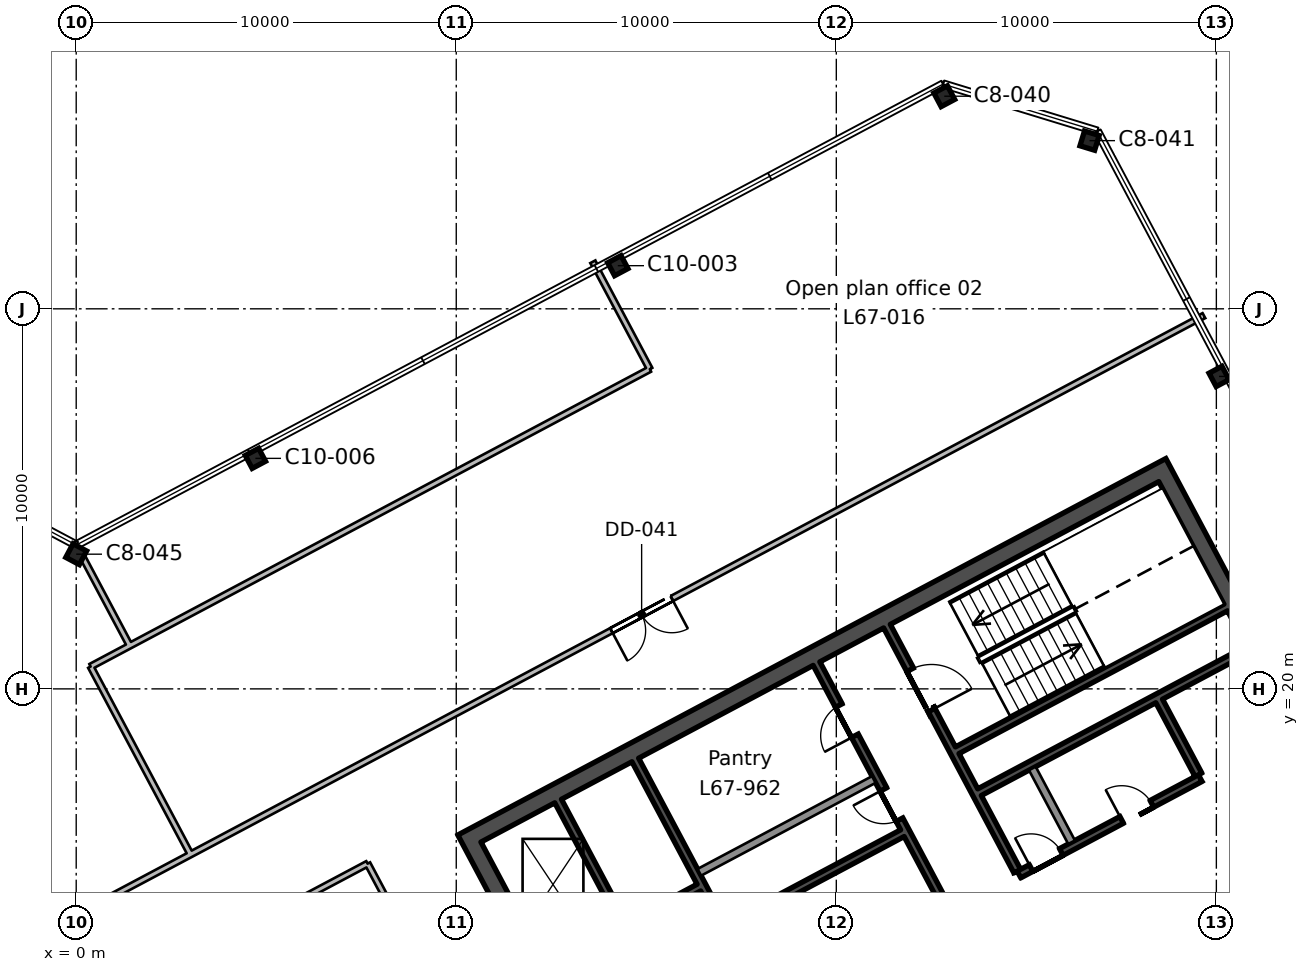
"""IFC4 building model, lengths in metres.
Left out: names, types, materials, properties, quantities, classifications, styles, units other than length and angle.
Written with IfcOpenShell. Run it as: python <this file> out.ifc"""

import sys

from ifc_helpers import new_model, si_unit, direction, frame, frame_2d, origin, origin_2d, place, context, subcontext, project, spatial, rectangle, i_section, extrude, element, fill, save


model = new_model("IFC4")
c1 = context("Model", 3, precision=1e-05, world=origin(), true_north=direction((0.0, 1.0)))
c2 = subcontext(c1, "Body", "Model", "MODEL_VIEW")
j1 = project(units=[si_unit("LENGTHUNIT", "METRE"), si_unit("PLANEANGLEUNIT", "RADIAN")], contexts=[c1])
p1 = place(None, origin())
s1 = spatial("IfcSite", under=j1, at=p1, CompositionType="ELEMENT")
p2 = place(p1, origin())
s2 = spatial("IfcBuilding", under=s1, at=p2, CompositionType="ELEMENT")
p3 = place(p2, frame((0.0, 0.0, 297.0)))
s3 = spatial("IfcBuildingStorey", under=s2, at=p3, CompositionType="ELEMENT", Elevation=297.0)
p4 = place(p3, frame((0.0, 23.544, 0.0), z_axis=(0.0, 0.0, 1.0), x_axis=(-0.882947592859, 0.469471562786, 0.0)))
e1 = element("IfcColumn", 1, at=p4, inside=s3, PredefinedType="COLUMN", context=c2, shape_type="SweptSolid", body=[
    extrude(i_section(OverallWidth=0.404, OverallDepth=0.406, WebThickness=0.027, FlangeThickness=0.044, FilletRadius=0.015, at=origin_2d()), origin(), (0.0, 0.0, 1.0), 3.9),
])
for number, where, z_axis, x_axis in (
    (2, (4.715, 26.065, 0.0), (0.0, 0.0, 1.0), (-0.883, -0.469, 0.0)),
    (3, (30.071, 28.221, 0.0), (0.0, 0.0, 1.0), (-0.469, 0.883, 0.0)),
    (4, (14.251, 31.135, 0.0), (0.0, 0.0, 1.0), (-0.883, -0.469, 0.0)),
):
    element("IfcColumn", number, at=place(p3, frame(where, z_axis=z_axis, x_axis=x_axis)), inside=s3, PredefinedType="COLUMN", context=c2, shape_type="SweptSolid", body=[
        extrude(i_section(OverallWidth=0.399, OverallDepth=0.386, WebThickness=0.021, FlangeThickness=0.033, FilletRadius=0.015, at=origin_2d()), origin(), (0.0, 0.0, 1.0), 3.9),
    ])
for number, where, z_axis, x_axis in (
    (5, (26.664, 34.425, 0.0), (0.0, 0.0, 1.0), (-0.956, 0.292, 0.0)),
    (6, (22.841, 35.594, 0.0), (0.0, 0.0, 1.0), (-0.883, -0.469, 0.0)),
):
    element("IfcColumn", number, at=place(p3, frame(where, z_axis=z_axis, x_axis=x_axis)), inside=s3, PredefinedType="COLUMN", context=c2, shape_type="SweptSolid", body=[
        extrude(i_section(OverallWidth=0.404, OverallDepth=0.406, WebThickness=0.027, FlangeThickness=0.044, FilletRadius=0.015, at=origin_2d()), origin(), (0.0, 0.0, 1.0), 3.9),
    ])
p5 = place(p3, frame((19.207, -0.604, 0.0), z_axis=(0.0, 0.0, 1.0), x_axis=(-0.469467968382, 0.882949504028, 0.0)))
e7 = element("IfcWall", 7, at=p5, inside=s3, PredefinedType="SHEAR", context=c2, shape_type="SweptSolid", body=[
    extrude(rectangle(XDim=19.1, YDim=0.45, at=frame_2d((9.55, 0.0))), origin(), (0.0, 0.0, 1.0), 3.9),
])
p6 = place(p5, frame((6.55, 0.0, 0.0)))
e8 = element("IfcOpeningElement", 8, at=p6, cuts=e7, PredefinedType="OPENING", context=c2, shape_type="SweptSolid", body=[
    extrude(rectangle(XDim=2.4, YDim=2.4, at=frame_2d((1.2, 1.2))), frame((0.0, 0.235, 0.0), z_axis=(0.0, -1.0, 0.0), x_axis=(1.0, 0.0, 0.0)), (0.0, 0.0, 1.0), 0.47),
])
p7 = place(p3, frame((37.439, 9.091, 0.0), z_axis=(0.0, 0.0, 1.0), x_axis=(-0.469467968382, 0.882949504028, 0.0)))
e9 = element("IfcWall", 9, at=p7, inside=s3, PredefinedType="SHEAR", context=c2, shape_type="SweptSolid", body=[
    extrude(rectangle(XDim=19.1, YDim=0.45, at=frame_2d((9.55, 0.0))), origin(), (0.0, 0.0, 1.0), 3.9),
])
p8 = place(p7, frame((10.15, 0.0, 0.0)))
e10 = element("IfcOpeningElement", 10, at=p8, cuts=e9, PredefinedType="OPENING", context=c2, shape_type="SweptSolid", body=[
    extrude(rectangle(XDim=2.4, YDim=2.4, at=frame_2d((1.2, 1.2))), frame((0.0, 0.235, 0.0), z_axis=(0.0, -1.0, 0.0), x_axis=(1.0, 0.0, 0.0)), (0.0, 0.0, 1.0), 0.47),
])
p9 = place(p3, frame((10.544, 16.167, 0.0), z_axis=(0.0, 0.0, 1.0), x_axis=(0.882947755831, 0.46947125628, 0.0)))
e11 = element("IfcWall", 11, at=p9, inside=s3, PredefinedType="SHEAR", context=c2, shape_type="SweptSolid", body=[
    extrude(rectangle(XDim=20.2, YDim=0.45, at=frame_2d((10.1, 0.0))), origin(), (0.0, 0.0, 1.0), 3.9),
])
p10 = place(p3, frame((14.394, 13.826, 0.0), z_axis=(0.0, 0.0, 1.0), x_axis=(-0.469494272526, 0.882935517501, 0.0)))
e12 = element("IfcWall", 12, at=p10, inside=s3, PredefinedType="SHEAR", context=c2, shape_type="SweptSolid", body=[
    extrude(rectangle(XDim=3.65, YDim=0.2, at=frame_2d((1.825, 0.0))), origin(), (0.0, 0.0, 1.0), 3.9),
])
p11 = place(p3, frame((18.138, 11.683, 0.0), z_axis=(0.0, 0.0, 1.0), x_axis=(-0.469480409012, 0.88294288918, 0.0)))
e13 = element("IfcWall", 13, at=p11, inside=s3, PredefinedType="SHEAR", context=c2, shape_type="SweptSolid", body=[
    extrude(rectangle(XDim=7.3, YDim=0.2, at=frame_2d((3.65, 0.0))), origin(), (0.0, 0.0, 1.0), 3.9),
])
p12 = place(p3, frame((22.906, 14.218, 0.0), z_axis=(0.0, 0.0, 1.0), x_axis=(-0.469480409012, 0.88294288918, 0.0)))
e14 = element("IfcWall", 14, at=p12, inside=s3, PredefinedType="SHEAR", context=c2, shape_type="SweptSolid", body=[
    extrude(rectangle(XDim=7.3, YDim=0.2, at=frame_2d((3.65, 0.0))), origin(), (0.0, 0.0, 1.0), 3.9),
])
p13 = place(p12, frame((2.65, 0.0, 0.0)))
e15 = element("IfcOpeningElement", 15, at=p13, cuts=e14, PredefinedType="OPENING", context=c2, shape_type="SweptSolid", body=[
    extrude(rectangle(XDim=0.9, YDim=2.1, at=frame_2d((0.45, 1.05))), frame((0.0, 0.11, 0.0), z_axis=(0.0, -1.0, 0.0), x_axis=(1.0, 0.0, 0.0)), (0.0, 0.0, 1.0), 0.22),
])
p14 = place(p12, frame((5.15, 0.0, 0.0)))
e16 = element("IfcOpeningElement", 16, at=p14, cuts=e14, PredefinedType="OPENING", context=c2, shape_type="SweptSolid", body=[
    extrude(rectangle(XDim=0.9, YDim=2.1, at=frame_2d((0.45, 1.05))), frame((0.0, 0.11, 0.0), z_axis=(0.0, -1.0, 0.0), x_axis=(1.0, 0.0, 0.0)), (0.0, 0.0, 1.0), 0.22),
])
p15 = place(p3, frame((24.76, 15.204, 0.0), z_axis=(0.0, 0.0, 1.0), x_axis=(-0.469494272526, 0.882935517501, 0.0)))
e17 = element("IfcWall", 17, at=p15, inside=s3, PredefinedType="SHEAR", context=c2, shape_type="SweptSolid", body=[
    extrude(rectangle(XDim=7.3, YDim=0.2, at=frame_2d((3.65, 0.0))), origin(), (0.0, 0.0, 1.0), 3.9),
])
p16 = place(p15, frame((4.8, 0.0, 0.0)))
e18 = element("IfcOpeningElement", 18, at=p16, cuts=e17, PredefinedType="OPENING", context=c2, shape_type="SweptSolid", body=[
    extrude(rectangle(XDim=1.2, YDim=2.1, at=frame_2d((0.6, 1.05))), frame((0.0, 0.11, 0.0), z_axis=(0.0, -1.0, 0.0), x_axis=(1.0, 0.0, 0.0)), (0.0, 0.0, 1.0), 0.22),
])
p17 = place(p3, frame((26.191, 15.965, 0.0), z_axis=(0.0, 0.0, 1.0), x_axis=(-0.469533832133, 0.882914480843, 0.0)))
e19 = element("IfcWall", 19, at=p17, inside=s3, PredefinedType="SOLIDWALL", context=c2, shape_type="SweptSolid", body=[
    extrude(rectangle(XDim=2.2, YDim=0.2, at=frame_2d((1.1, 0.0))), origin(), (0.0, 0.0, 1.0), 3.9),
])
p18 = place(p3, frame((29.528, 17.739, 0.0), z_axis=(0.0, 0.0, 1.0), x_axis=(-0.469401318492, 0.882984938828, 0.0)))
e20 = element("IfcWall", 20, at=p18, inside=s3, PredefinedType="SHEAR", context=c2, shape_type="SweptSolid", body=[
    extrude(rectangle(XDim=2.2, YDim=0.2, at=frame_2d((1.1, 0.0))), origin(), (0.0, 0.0, 1.0), 3.9),
])
p19 = place(p3, frame((24.726, 11.222, 0.0), z_axis=(0.0, 0.0, 1.0), x_axis=(0.882940221191, 0.469485426614, 0.0)))
e21 = element("IfcWall", 21, at=p19, inside=s3, PredefinedType="SHEAR", context=c2, shape_type="SweptSolid", body=[
    extrude(rectangle(XDim=10.0, YDim=0.2, at=frame_2d((5.0, 0.0))), origin(), (0.0, 0.0, 1.0), 3.9),
])
p20 = place(p19, frame((6.3, 0.0, 0.0)))
e22 = element("IfcOpeningElement", 22, at=p20, cuts=e21, PredefinedType="OPENING", context=c2, shape_type="SweptSolid", body=[
    extrude(rectangle(XDim=1.2, YDim=2.1, at=frame_2d((0.6, 1.05))), frame((0.0, 0.11, 0.0), z_axis=(0.0, -1.0, 0.0), x_axis=(1.0, 0.0, 0.0)), (0.0, 0.0, 1.0), 0.22),
])
p21 = place(p19, frame((0.36, 0.0, 0.0)))
e23 = element("IfcOpeningElement", 23, at=p21, cuts=e21, PredefinedType="OPENING", context=c2, shape_type="SweptSolid", body=[
    extrude(rectangle(XDim=0.9, YDim=2.1, at=frame_2d((0.45, 1.05))), frame((0.0, 0.11, 0.0), z_axis=(0.0, -1.0, 0.0), x_axis=(1.0, 0.0, 0.0)), (0.0, 0.0, 1.0), 0.22),
])
p22 = place(p19, frame((3.06, 0.0, 0.0)))
e24 = element("IfcOpeningElement", 24, at=p22, cuts=e21, PredefinedType="OPENING", context=c2, shape_type="SweptSolid", body=[
    extrude(rectangle(XDim=0.9, YDim=2.1, at=frame_2d((0.45, 1.05))), frame((0.0, 0.11, 0.0), z_axis=(0.0, -1.0, 0.0), x_axis=(1.0, 0.0, 0.0)), (0.0, 0.0, 1.0), 0.22),
])
p23 = place(p3, frame((24.807, 15.116, 0.0), z_axis=(0.0, 0.0, 1.0), x_axis=(0.882942972946, 0.469480251476, 0.0)))
e25 = element("IfcWall", 25, at=p23, inside=s3, PredefinedType="SHEAR", context=c2, shape_type="SweptSolid", body=[
    extrude(rectangle(XDim=5.4, YDim=0.2, at=frame_2d((2.7, 0.0))), origin(), (0.0, 0.0, 1.0), 3.9),
])
p24 = place(p23, frame((0.36, 0.0, 0.0)))
e26 = element("IfcOpeningElement", 26, at=p24, cuts=e25, PredefinedType="OPENING", context=c2, shape_type="SweptSolid", body=[
    extrude(rectangle(XDim=0.9, YDim=2.1, at=frame_2d((0.45, 1.05))), frame((0.0, 0.11, 0.0), z_axis=(0.0, -1.0, 0.0), x_axis=(1.0, 0.0, 0.0)), (0.0, 0.0, 1.0), 0.22),
])
p25 = place(p23, frame((3.06, 0.0, 0.0)))
e27 = element("IfcOpeningElement", 27, at=p25, cuts=e25, PredefinedType="OPENING", context=c2, shape_type="SweptSolid", body=[
    extrude(rectangle(XDim=0.9, YDim=2.1, at=frame_2d((0.45, 1.05))), frame((0.0, 0.11, 0.0), z_axis=(0.0, -1.0, 0.0), x_axis=(1.0, 0.0, 0.0)), (0.0, 0.0, 1.0), 0.22),
])
p26 = place(p3, frame((17.147, 13.761, 0.0), z_axis=(0.0, 0.0, 1.0), x_axis=(0.882964314875, 0.469440111896, 0.0)))
e28 = element("IfcWall", 28, at=p26, inside=s3, PredefinedType="SHEAR", context=c2, shape_type="SweptSolid", body=[
    extrude(rectangle(XDim=5.2, YDim=0.2, at=frame_2d((2.6, 0.0))), origin(), (0.0, 0.0, 1.0), 3.9),
])
p27 = place(p3, frame((23.769, 17.282, 0.0), z_axis=(0.0, 0.0, 1.0), x_axis=(0.882940221191, 0.469485426614, 0.0)))
e29 = element("IfcWall", 29, at=p27, inside=s3, PredefinedType="SHEAR", context=c2, shape_type="SweptSolid", body=[
    extrude(rectangle(XDim=8.0, YDim=0.2, at=frame_2d((4.0, 0.0))), origin(), (0.0, 0.0, 1.0), 3.9),
])
p28 = place(p3, frame((12.41, 12.658, 0.0), z_axis=(0.0, 0.0, 1.0), x_axis=(0.8829484765, 0.469469900894, 0.0)))
e30 = element("IfcWall", 30, at=p28, inside=s3, PredefinedType="SHEAR", context=c2, shape_type="SweptSolid", body=[
    extrude(rectangle(XDim=4.5, YDim=0.2, at=frame_2d((2.25, 0.0))), origin(), (0.0, 0.0, 1.0), 3.9),
])
p29 = place(p28, frame((0.6, 0.0, 0.0)))
e31 = element("IfcOpeningElement", 31, at=p29, cuts=e30, PredefinedType="OPENING", context=c2, shape_type="SweptSolid", body=[
    extrude(rectangle(XDim=1.1, YDim=2.1, at=frame_2d((0.55, 1.05))), frame((0.0, 0.11, 0.0), z_axis=(0.0, -1.0, 0.0), x_axis=(1.0, 0.0, 0.0)), (0.0, 0.0, 1.0), 0.22),
])
p30 = place(p3, frame((23.182, 18.385, 0.0), z_axis=(0.0, 0.0, 1.0), x_axis=(0.88295287151, 0.469461634952, 0.0)))
e32 = element("IfcWall", 32, at=p30, inside=s3, PredefinedType="SHEAR", context=c2, shape_type="SweptSolid", body=[
    extrude(rectangle(XDim=8.0, YDim=0.2, at=frame_2d((4.0, 0.0))), origin(), (0.0, 0.0, 1.0), 3.9),
])
p31 = place(p3, frame((16.396, 15.173, 0.0), z_axis=(0.0, 0.0, 1.0), x_axis=(0.882934506056, 0.469496174655, 0.0)))
e33 = element("IfcWall", 33, at=p31, inside=s3, PredefinedType="SOLIDWALL", context=c2, shape_type="SweptSolid", body=[
    extrude(rectangle(XDim=5.2, YDim=0.2, at=frame_2d((2.6, 0.0))), origin(), (0.0, 0.0, 1.0), 3.9),
])
p32 = place(p3, frame((-48.541, 39.854, 0.0), z_axis=(0.0, 0.0, 1.0), x_axis=(0.882945008423, -0.469476423372, 0.0)))
e34 = element("IfcWall", 34, at=p32, inside=s3, PredefinedType="PARTITIONING", context=c2, shape_type="SweptSolid", body=[
    extrude(rectangle(XDim=54.976, YDim=0.15, at=frame_2d((27.488, 0.0))), origin(), (0.0, 0.0, 1.0), 3.54),
])
p33 = place(p32, frame((39.35, 0.0, 0.0)))
e35 = element("IfcOpeningElement", 35, at=p33, cuts=e34, PredefinedType="OPENING", context=c2, shape_type="SweptSolid", body=[
    extrude(rectangle(XDim=1.0, YDim=2.1, at=frame_2d((0.5, 1.05))), frame((0.0, 0.085, 0.0), z_axis=(0.0, -1.0, 0.0), x_axis=(1.0, 0.0, 0.0)), (0.0, 0.0, 1.0), 0.17),
])
p34 = place(p32, frame((26.95, 0.0, 0.0)))
e36 = element("IfcOpeningElement", 36, at=p34, cuts=e34, PredefinedType="OPENING", context=c2, shape_type="SweptSolid", body=[
    extrude(rectangle(XDim=1.0, YDim=2.1, at=frame_2d((0.5, 1.05))), frame((0.0, 0.085, 0.0), z_axis=(0.0, -1.0, 0.0), x_axis=(1.0, 0.0, 0.0)), (0.0, 0.0, 1.0), 0.17),
])
p35 = place(p32, frame((21.049, 0.0, 0.0)))
e37 = element("IfcOpeningElement", 37, at=p35, cuts=e34, PredefinedType="OPENING", context=c2, shape_type="SweptSolid", body=[
    extrude(rectangle(XDim=1.0, YDim=2.1, at=frame_2d((0.5, 1.05))), frame((0.0, 0.085, 0.0), z_axis=(0.0, -1.0, 0.0), x_axis=(1.0, 0.0, 0.0)), (0.0, 0.0, 1.0), 0.17),
])
p36 = place(p32, frame((15.35, 0.0, 0.0)))
e38 = element("IfcOpeningElement", 38, at=p36, cuts=e34, PredefinedType="OPENING", context=c2, shape_type="SweptSolid", body=[
    extrude(rectangle(XDim=1.0, YDim=2.1, at=frame_2d((0.5, 1.05))), frame((0.0, 0.085, 0.0), z_axis=(0.0, -1.0, 0.0), x_axis=(1.0, 0.0, 0.0)), (0.0, 0.0, 1.0), 0.17),
])
p37 = place(p3, frame((0.0, 14.044, 0.0), z_axis=(0.0, 0.0, 1.0), x_axis=(0.882952097871, 0.469463089992, 0.0)))
e39 = element("IfcWall", 39, at=p37, inside=s3, PredefinedType="PARTITIONING", context=c2, shape_type="SweptSolid", body=[
    extrude(rectangle(XDim=33.607, YDim=0.15, at=frame_2d((16.803, 0.0))), origin(), (0.0, 0.0, 1.0), 3.54),
])
p38 = place(p37, frame((15.95, 0.0, 0.0)))
e40 = element("IfcOpeningElement", 40, at=p38, cuts=e39, PredefinedType="OPENING", context=c2, shape_type="SweptSolid", body=[
    extrude(rectangle(XDim=1.8, YDim=2.1, at=frame_2d((0.9, 1.05))), frame((0.0, 0.085, 0.0), z_axis=(0.0, -1.0, 0.0), x_axis=(1.0, 0.0, 0.0)), (0.0, 0.0, 1.0), 0.17),
])
p39 = place(p3, frame((2.38, 16.825, 0.0), z_axis=(0.0, 0.0, 1.0), x_axis=(0.469328592165, -0.88302359684, 0.0)))
e41 = element("IfcWall", 41, at=p39, inside=s3, PredefinedType="PARTITIONING", context=c2, shape_type="SweptSolid", body=[
    extrude(rectangle(XDim=1.338, YDim=0.15, at=frame_2d((0.669, 0.0))), origin(), (0.0, 0.0, 1.0), 3.54),
])
p40 = place(p3, frame((0.178, 23.45, 0.0), z_axis=(0.0, 0.0, 1.0), x_axis=(0.469495603372, -0.882934809833, 0.0)))
e42 = element("IfcWall", 42, at=p40, inside=s3, PredefinedType="PARTITIONING", context=c2, shape_type="SweptSolid", body=[
    extrude(rectangle(XDim=2.622, YDim=0.15, at=frame_2d((1.311, 0.0))), origin(), (0.0, 0.0, 1.0), 3.54),
])
p41 = place(p3, frame((1.405, 21.133, 0.0), z_axis=(0.0, 0.0, 1.0), x_axis=(0.882934197132, 0.469496755618, 0.0)))
e43 = element("IfcWall", 43, at=p41, inside=s3, PredefinedType="PARTITIONING", context=c2, shape_type="SweptSolid", body=[
    extrude(rectangle(XDim=15.504, YDim=0.15, at=frame_2d((7.752, 0.0))), origin(), (0.0, 0.0, 1.0), 3.54),
])
p42 = place(p3, frame((15.094, 28.412, 0.0), z_axis=(0.0, 0.0, 1.0), x_axis=(-0.469082703107, 0.883154243406, 0.0)))
e44 = element("IfcWall", 44, at=p42, inside=s3, PredefinedType="PARTITIONING", context=c2, shape_type="SweptSolid", body=[
    extrude(rectangle(XDim=3.2, YDim=0.15, at=frame_2d((1.6, 0.0))), origin(), (0.0, 0.0, 1.0), 3.54),
])
p43 = place(p3, frame((2.38, 16.825, 0.0), z_axis=(0.0, 0.0, 1.0), x_axis=(-0.469505616232, 0.882929485478, 0.0)))
e45 = element("IfcWall", 45, at=p43, inside=s3, PredefinedType="PARTITIONING", context=c2, shape_type="SweptSolid", body=[
    extrude(rectangle(XDim=4.262, YDim=0.15, at=frame_2d((2.131, 0.0))), origin(), (0.0, 0.0, 1.0), 3.54),
])
p44 = place(p3, frame((1.405, 21.133, 0.0), z_axis=(0.0, 0.0, 1.0), x_axis=(-0.882753784089, -0.469835882704, 0.0)))
e46 = element("IfcWall", 46, at=p44, inside=s3, PredefinedType="PARTITIONING", context=c2, shape_type="SweptSolid", body=[
    extrude(rectangle(XDim=1.162, YDim=0.15, at=frame_2d((0.581, 0.0))), origin(), (0.0, 0.0, 1.0), 3.54),
])
p45 = place(p3, frame((7.667, 15.402, 0.0), z_axis=(0.0, 0.0, 1.0), x_axis=(-0.883005489543, -0.469362658759, 0.0)))
e47 = element("IfcWall", 47, at=p45, inside=s3, PredefinedType="PARTITIONING", context=c2, shape_type="SweptSolid", body=[
    extrude(rectangle(XDim=3.413, YDim=0.15, at=frame_2d((1.707, 0.0))), origin(), (0.0, 0.0, 1.0), 3.54),
])
p46 = place(p3, frame((8.518, 13.8, 0.0), z_axis=(0.0, 0.0, 1.0), x_axis=(-0.469148666032, 0.883119204389, 0.0)))
e48 = element("IfcWall", 48, at=p46, inside=s3, PredefinedType="PARTITIONING", context=c2, shape_type="SweptSolid", body=[
    extrude(rectangle(XDim=1.814, YDim=0.15, at=frame_2d((0.907, 0.0))), origin(), (0.0, 0.0, 1.0), 3.54),
])
p47 = place(p20, frame((1.2, 0.0, 0.0), z_axis=(0.0, 0.0, 1.0), x_axis=(-1.0, 0.0, 0.0)))
e49 = element("IfcDoor", 49, at=p47, inside=s3, OperationType="SINGLE_SWING_RIGHT", PredefinedType="DOOR", context=c2, shape_type="SweptSolid", body=[
    extrude(rectangle(XDim=1.2, YDim=2.1, at=frame_2d((0.6, 1.05))), frame((0.0, 0.025, 0.0), z_axis=(0.0, -1.0, 0.0), x_axis=(1.0, 0.0, 0.0)), (0.0, 0.0, 1.0), 0.05),
])
fill(e22, e49)
p48 = place(p16, frame((1.2, 0.0, 0.0), z_axis=(0.0, 0.0, 1.0), x_axis=(-1.0, 0.0, 0.0)))
e50 = element("IfcDoor", 50, at=p48, inside=s3, OperationType="SINGLE_SWING_RIGHT", PredefinedType="DOOR", context=c2, shape_type="SweptSolid", body=[
    extrude(rectangle(XDim=1.2, YDim=2.1, at=frame_2d((0.6, 1.05))), frame((0.0, 0.025, 0.0), z_axis=(0.0, -1.0, 0.0), x_axis=(1.0, 0.0, 0.0)), (0.0, 0.0, 1.0), 0.05),
])
fill(e18, e50)
p49 = place(p24, origin())
e51 = element("IfcDoor", 51, at=p49, inside=s3, OperationType="SINGLE_SWING_LEFT", PredefinedType="DOOR", context=c2, shape_type="SweptSolid", body=[
    extrude(rectangle(XDim=0.9, YDim=2.1, at=frame_2d((0.45, 1.05))), frame((0.0, 0.025, 0.0), z_axis=(0.0, -1.0, 0.0), x_axis=(1.0, 0.0, 0.0)), (0.0, 0.0, 1.0), 0.05),
])
fill(e26, e51)
p50 = place(p25, origin())
e52 = element("IfcDoor", 52, at=p50, inside=s3, OperationType="SINGLE_SWING_LEFT", PredefinedType="DOOR", context=c2, shape_type="SweptSolid", body=[
    extrude(rectangle(XDim=0.9, YDim=2.1, at=frame_2d((0.45, 1.05))), frame((0.0, 0.025, 0.0), z_axis=(0.0, -1.0, 0.0), x_axis=(1.0, 0.0, 0.0)), (0.0, 0.0, 1.0), 0.05),
])
fill(e27, e52)
p51 = place(p13, origin())
e53 = element("IfcDoor", 53, at=p51, inside=s3, OperationType="SINGLE_SWING_RIGHT", PredefinedType="DOOR", context=c2, shape_type="SweptSolid", body=[
    extrude(rectangle(XDim=0.9, YDim=2.1, at=frame_2d((0.45, 1.05))), frame((0.0, 0.025, 0.0), z_axis=(0.0, -1.0, 0.0), x_axis=(1.0, 0.0, 0.0)), (0.0, 0.0, 1.0), 0.05),
])
fill(e15, e53)
p52 = place(p14, origin())
e54 = element("IfcDoor", 54, at=p52, inside=s3, OperationType="SINGLE_SWING_LEFT", PredefinedType="DOOR", context=c2, shape_type="SweptSolid", body=[
    extrude(rectangle(XDim=0.9, YDim=2.1, at=frame_2d((0.45, 1.05))), frame((0.0, 0.025, 0.0), z_axis=(0.0, -1.0, 0.0), x_axis=(1.0, 0.0, 0.0)), (0.0, 0.0, 1.0), 0.05),
])
fill(e16, e54)
p53 = place(p38, frame((1.8, 0.0, 0.0), z_axis=(0.0, 0.0, 1.0), x_axis=(-1.0, 0.0, 0.0)))
e55 = element("IfcDoor", 55, at=p53, inside=s3, OperationType="DOUBLE_DOOR_SINGLE_SWING", PredefinedType="DOOR", context=c2, shape_type="SweptSolid", body=[
    extrude(rectangle(XDim=1.8, YDim=2.1, at=frame_2d((0.9, 1.05))), frame((0.0, 0.025, 0.0), z_axis=(0.0, -1.0, 0.0), x_axis=(1.0, 0.0, 0.0)), (0.0, 0.0, 1.0), 0.05),
])
fill(e40, e55)
save(model, sys.argv[1])
